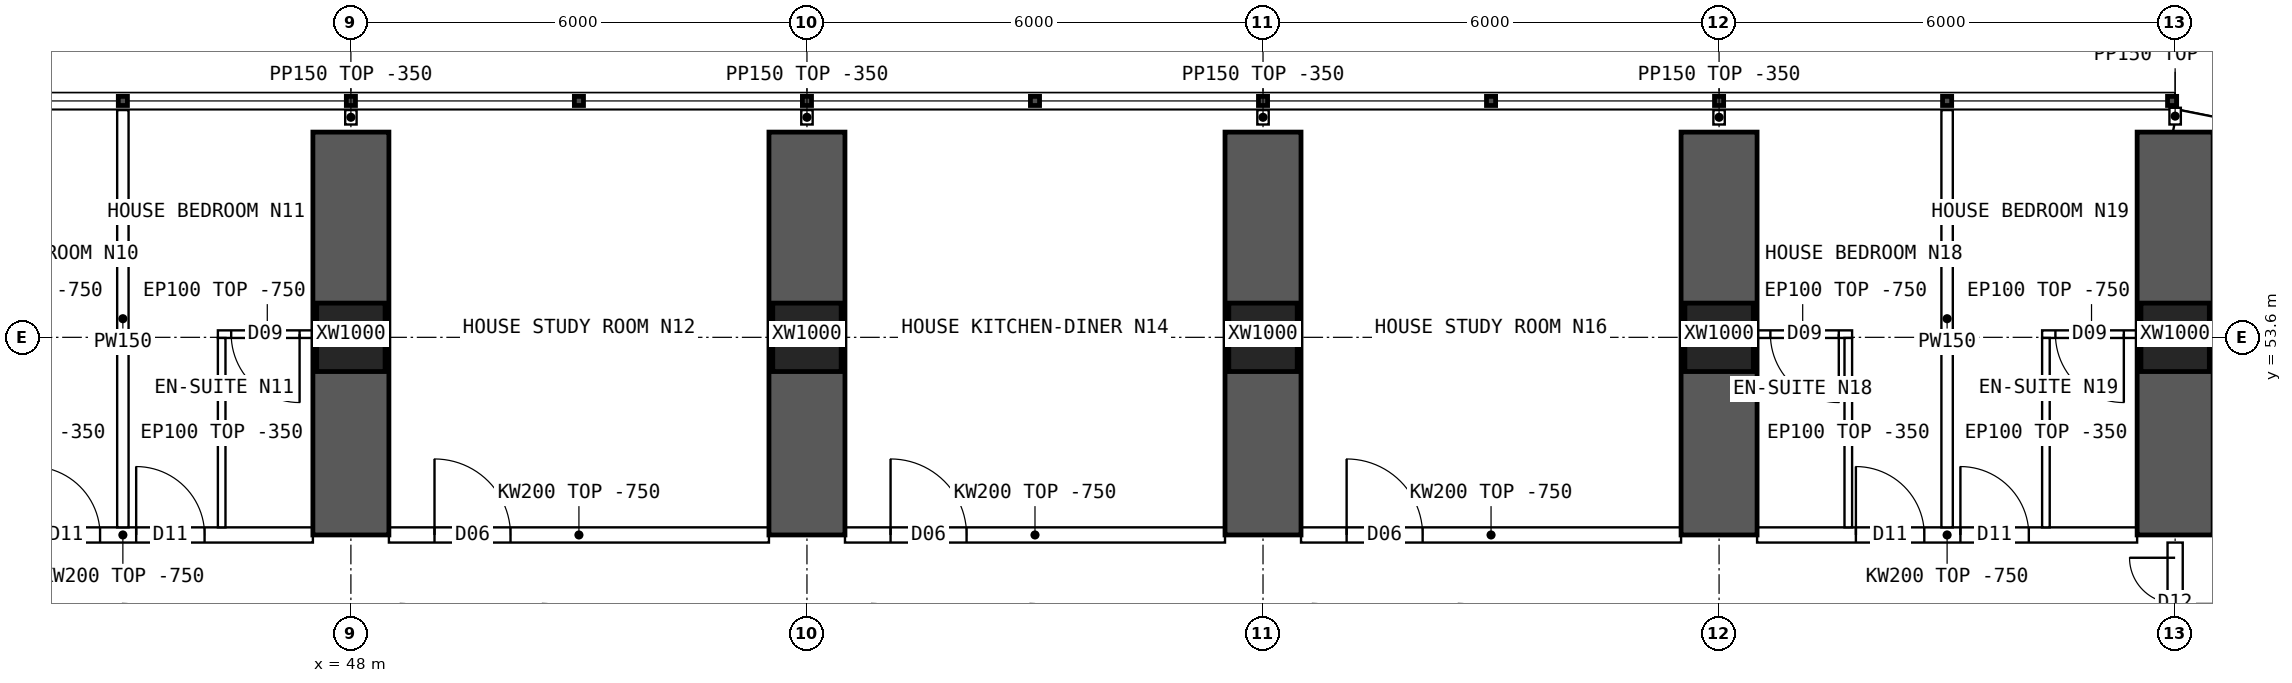
"""IFC4 building model, lengths in metres.
Left out: names, types, materials, properties, quantities, classifications, styles, units other than length and angle.
Written with IfcOpenShell. Run it as: python <this file> out.ifc"""

import sys

from ifc_helpers import new_model, si_unit, direction, frame, frame_2d, origin, origin_2d, place, context, subcontext, project, spatial, polyline, rectangle, hollow_rectangle, outline, extrude, element, fill, save


model = new_model("IFC4")
c1 = context("Model", 3, precision=1e-05, world=origin(), true_north=direction((0.0, 1.0)))
c2 = subcontext(c1, "Body", "Model", "MODEL_VIEW")
j1 = project(units=[si_unit("LENGTHUNIT", "METRE"), si_unit("PLANEANGLEUNIT", "RADIAN")], contexts=[c1])
p1 = place(None, origin())
s1 = spatial("IfcSite", under=j1, at=p1, CompositionType="ELEMENT")
p2 = place(p1, origin())
s2 = spatial("IfcBuilding", under=s1, at=p2, CompositionType="ELEMENT")
p3 = place(p2, frame((0.0, 0.0, 65.2)))
s3 = spatial("IfcBuildingStorey", under=s2, at=p3, CompositionType="ELEMENT", Elevation=65.2)
for number, where, z_axis, x_axis in (
    (1, (48.0, 53.6, 0.0), (0.0, 0.0, 1.0), (1.0, 0.0, 0.0)),
    (2, (54.0, 53.6, 0.0), (0.0, 0.0, 1.0), (1.0, 0.0, 0.0)),
    (3, (60.0, 53.6, 0.0), (0.0, 0.0, 1.0), (1.0, 0.0, 0.0)),
    (4, (66.0, 53.6, 0.0), (0.0, 0.0, 1.0), (1.0, 0.0, 0.0)),
    (5, (72.0, 53.6, 0.0), (0.0, 0.0, 1.0), (1.0, 0.0, 0.0)),
):
    element("IfcColumn", number, at=place(p3, frame(where, z_axis=z_axis, x_axis=x_axis)), inside=s3, PredefinedType="COLUMN", context=c2, shape_type="SweptSolid", body=[
        extrude(hollow_rectangle(XDim=0.9, YDim=0.9, WallThickness=0.09, at=origin_2d()), origin(), (0.0, 0.0, 1.0), 3.75),
    ])
for number, where, z_axis, x_axis in (
    (6, (48.0, 51.0, 0.0), (0.0, 0.0, 1.0), (0.0, 1.0, 0.0)),
    (7, (54.0, 51.0, 0.0), (0.0, 0.0, 1.0), (0.0, 1.0, 0.0)),
    (8, (60.0, 51.0, 0.0), (0.0, 0.0, 1.0), (0.0, 1.0, 0.0)),
    (9, (66.0, 51.0, 0.0), (0.0, 0.0, 1.0), (0.0, 1.0, 0.0)),
    (10, (72.0, 51.0, 0.0), (0.0, 0.0, 1.0), (0.0, 1.0, 0.0)),
):
    element("IfcWall", number, at=place(p3, frame(where, z_axis=z_axis, x_axis=x_axis)), inside=s3, PredefinedType="SHEAR", context=c2, shape_type="SweptSolid", body=[
        extrude(rectangle(XDim=5.3, YDim=1.0, at=frame_2d((2.65, 0.0))), origin(), (0.0, 0.0, 1.0), 3.75),
    ])
p4 = place(p3, frame((75.157, 55.822, 0.0), z_axis=(0.0, 0.0, 1.0), x_axis=(-0.980787251524, 0.195080412259, 0.0)))
e11 = element("IfcWall", 11, at=p4, inside=s3, PredefinedType="SOLIDWALL", context=c2, shape_type="SweptSolid", body=[
    extrude(outline(polyline([(-0.03, -0.15), (3.249, -0.15), (3.189, 0.15), (0.03, 0.15), (-0.03, -0.15)])), origin(), (0.0, 0.0, 1.0), 3.4),
])
p5 = place(p4, frame((0.909, 0.0, 0.9)))
e12 = element("IfcOpeningElement", 12, at=p5, cuts=e11, PredefinedType="OPENING", context=c2, shape_type="SweptSolid", body=[
    extrude(rectangle(XDim=1.4, YDim=1.8, at=frame_2d((0.7, 0.9))), frame((0.0, 0.16, 0.0), z_axis=(0.0, -1.0, 0.0), x_axis=(1.0, 0.0, 0.0)), (0.0, 0.0, 1.0), 0.32),
])
p6 = place(p3, frame((42.5, 51.0, 0.0), z_axis=(0.0, 0.0, 1.0), x_axis=(1.0, 0.0, 0.0)))
e13 = element("IfcWall", 13, at=p6, inside=s3, PredefinedType="SOLIDWALL", context=c2, shape_type="SweptSolid", body=[
    extrude(outline(polyline([(0.0, 0.0), (5.0, 0.0), (5.0, 3.0), (0.0, 3.0), (0.0, 0.0)])), frame((0.0, 0.1, 0.0), z_axis=(0.0, -1.0, 0.0), x_axis=(1.0, 0.0, 0.0)), (0.0, 0.0, 1.0), 0.2),
])
p7 = place(p6, frame((1.3, 0.0, 0.0)))
e14 = element("IfcOpeningElement", 14, at=p7, cuts=e13, PredefinedType="OPENING", context=c2, shape_type="SweptSolid", body=[
    extrude(rectangle(XDim=0.9, YDim=2.1, at=frame_2d((0.45, 1.05))), frame((0.0, 0.11, 0.0), z_axis=(0.0, -1.0, 0.0), x_axis=(1.0, 0.0, 0.0)), (0.0, 0.0, 1.0), 0.22),
])
p8 = place(p6, frame((2.675, 0.0, 0.0)))
e15 = element("IfcOpeningElement", 15, at=p8, cuts=e13, PredefinedType="OPENING", context=c2, shape_type="SweptSolid", body=[
    extrude(rectangle(XDim=0.9, YDim=2.1, at=frame_2d((0.45, 1.05))), frame((0.0, 0.11, 0.0), z_axis=(0.0, -1.0, 0.0), x_axis=(1.0, 0.0, 0.0)), (0.0, 0.0, 1.0), 0.22),
])
p9 = place(p3, frame((48.5, 51.0, 0.0), z_axis=(0.0, 0.0, 1.0), x_axis=(1.0, 0.0, 0.0)))
e16 = element("IfcWall", 16, at=p9, inside=s3, PredefinedType="SOLIDWALL", context=c2, shape_type="SweptSolid", body=[
    extrude(outline(polyline([(0.0, 0.0), (5.0, 0.0), (5.0, 3.0), (0.0, 3.0), (0.0, 0.0)])), frame((0.0, 0.1, 0.0), z_axis=(0.0, -1.0, 0.0), x_axis=(1.0, 0.0, 0.0)), (0.0, 0.0, 1.0), 0.2),
])
p10 = place(p9, frame((0.6, 0.0, 0.0)))
e17 = element("IfcOpeningElement", 17, at=p10, cuts=e16, PredefinedType="OPENING", context=c2, shape_type="SweptSolid", body=[
    extrude(rectangle(XDim=1.0, YDim=2.1, at=frame_2d((0.5, 1.05))), frame((0.0, 0.11, 0.0), z_axis=(0.0, -1.0, 0.0), x_axis=(1.0, 0.0, 0.0)), (0.0, 0.0, 1.0), 0.22),
])
p11 = place(p3, frame((54.5, 51.0, 0.0), z_axis=(0.0, 0.0, 1.0), x_axis=(1.0, 0.0, 0.0)))
e18 = element("IfcWall", 18, at=p11, inside=s3, PredefinedType="SOLIDWALL", context=c2, shape_type="SweptSolid", body=[
    extrude(outline(polyline([(0.0, 0.0), (5.0, 0.0), (5.0, 3.0), (0.0, 3.0), (0.0, 0.0)])), frame((0.0, 0.1, 0.0), z_axis=(0.0, -1.0, 0.0), x_axis=(1.0, 0.0, 0.0)), (0.0, 0.0, 1.0), 0.2),
])
p12 = place(p11, frame((0.6, 0.0, 0.0)))
e19 = element("IfcOpeningElement", 19, at=p12, cuts=e18, PredefinedType="OPENING", context=c2, shape_type="SweptSolid", body=[
    extrude(rectangle(XDim=1.0, YDim=2.1, at=frame_2d((0.5, 1.05))), frame((0.0, 0.11, 0.0), z_axis=(0.0, -1.0, 0.0), x_axis=(1.0, 0.0, 0.0)), (0.0, 0.0, 1.0), 0.22),
])
p13 = place(p3, frame((60.5, 51.0, 0.0), z_axis=(0.0, 0.0, 1.0), x_axis=(1.0, 0.0, 0.0)))
e20 = element("IfcWall", 20, at=p13, inside=s3, PredefinedType="SOLIDWALL", context=c2, shape_type="SweptSolid", body=[
    extrude(outline(polyline([(0.0, 0.0), (5.0, 0.0), (5.0, 3.0), (0.0, 3.0), (0.0, 0.0)])), frame((0.0, 0.1, 0.0), z_axis=(0.0, -1.0, 0.0), x_axis=(1.0, 0.0, 0.0)), (0.0, 0.0, 1.0), 0.2),
])
p14 = place(p13, frame((0.6, 0.0, 0.0)))
e21 = element("IfcOpeningElement", 21, at=p14, cuts=e20, PredefinedType="OPENING", context=c2, shape_type="SweptSolid", body=[
    extrude(rectangle(XDim=1.0, YDim=2.1, at=frame_2d((0.5, 1.05))), frame((0.0, 0.11, 0.0), z_axis=(0.0, -1.0, 0.0), x_axis=(1.0, 0.0, 0.0)), (0.0, 0.0, 1.0), 0.22),
])
p15 = place(p3, frame((66.5, 51.0, 0.0), z_axis=(0.0, 0.0, 1.0), x_axis=(1.0, 0.0, 0.0)))
e22 = element("IfcWall", 22, at=p15, inside=s3, PredefinedType="SOLIDWALL", context=c2, shape_type="SweptSolid", body=[
    extrude(outline(polyline([(0.0, 0.0), (5.0, 0.0), (5.0, 3.0), (0.0, 3.0), (0.0, 0.0)])), frame((0.0, 0.1, 0.0), z_axis=(0.0, -1.0, 0.0), x_axis=(1.0, 0.0, 0.0)), (0.0, 0.0, 1.0), 0.2),
])
p16 = place(p15, frame((1.3, 0.0, 0.0)))
e23 = element("IfcOpeningElement", 23, at=p16, cuts=e22, PredefinedType="OPENING", context=c2, shape_type="SweptSolid", body=[
    extrude(rectangle(XDim=0.9, YDim=2.1, at=frame_2d((0.45, 1.05))), frame((0.0, 0.11, 0.0), z_axis=(0.0, -1.0, 0.0), x_axis=(1.0, 0.0, 0.0)), (0.0, 0.0, 1.0), 0.22),
])
p17 = place(p15, frame((2.675, 0.0, 0.0)))
e24 = element("IfcOpeningElement", 24, at=p17, cuts=e22, PredefinedType="OPENING", context=c2, shape_type="SweptSolid", body=[
    extrude(rectangle(XDim=0.9, YDim=2.1, at=frame_2d((0.45, 1.05))), frame((0.0, 0.11, 0.0), z_axis=(0.0, -1.0, 0.0), x_axis=(1.0, 0.0, 0.0)), (0.0, 0.0, 1.0), 0.22),
])
p18 = place(p3, frame((45.0, 56.59, 0.0), z_axis=(0.0, 0.0, 1.0), x_axis=(0.0, -1.0, 0.0)))
e25 = element("IfcWall", 25, at=p18, inside=s3, PredefinedType="PARTITIONING", context=c2, shape_type="SweptSolid", body=[
    extrude(outline(polyline([(0.0, 0.0), (5.49, 0.0), (5.49, 3.0), (5.442, 3.0), (5.44, 3.4), (3.192, 3.4), (3.19, 3.0), (2.792, 3.0), (2.79, 3.4), (0.0, 3.4), (0.0, 0.0)])), frame((0.0, 0.075, 0.0), z_axis=(0.0, -1.0, 0.0), x_axis=(1.0, 0.0, 0.0)), (0.0, 0.0, 1.0), 0.15),
])
p19 = place(p3, frame((46.25, 53.642, 0.0), z_axis=(0.0, 0.0, 1.0), x_axis=(1.0, 0.0, 0.0)))
e26 = element("IfcWall", 26, at=p19, inside=s3, PredefinedType="PARTITIONING", context=c2, shape_type="SweptSolid", body=[
    extrude(outline(polyline([(0.0, 0.0), (1.3, 0.0), (1.3, 3.0), (0.0, 3.0), (0.0, 0.0)])), frame((0.0, 0.05, 0.0), z_axis=(0.0, -1.0, 0.0), x_axis=(1.0, 0.0, 0.0)), (0.0, 0.0, 1.0), 0.1),
])
p20 = place(p19, frame((0.175, 0.0, 0.0)))
e27 = element("IfcOpeningElement", 27, at=p20, cuts=e26, PredefinedType="OPENING", context=c2, shape_type="SweptSolid", body=[
    extrude(rectangle(XDim=0.9, YDim=2.1, at=frame_2d((0.45, 1.05))), frame((0.0, 0.06, 0.0), z_axis=(0.0, -1.0, 0.0), x_axis=(1.0, 0.0, 0.0)), (0.0, 0.0, 1.0), 0.12),
])
p21 = place(p3, frame((46.3, 53.592, 0.0), z_axis=(0.0, 0.0, 1.0), x_axis=(0.0, -1.0, 0.0)))
e28 = element("IfcWall", 28, at=p21, inside=s3, PredefinedType="PARTITIONING", context=c2, shape_type="SweptSolid", body=[
    extrude(outline(polyline([(0.0, 0.0), (2.492, 0.0), (2.492, 3.0), (2.444, 3.0), (2.442, 3.4), (0.194, 3.4), (0.192, 3.0), (0.0, 3.0), (0.0, 0.0)])), frame((0.0, 0.05, 0.0), z_axis=(0.0, -1.0, 0.0), x_axis=(1.0, 0.0, 0.0)), (0.0, 0.0, 1.0), 0.1),
])
p22 = place(p3, frame((69.0, 56.59, 0.0), z_axis=(0.0, 0.0, 1.0), x_axis=(0.0, -1.0, 0.0)))
e29 = element("IfcWall", 29, at=p22, inside=s3, PredefinedType="PARTITIONING", context=c2, shape_type="SweptSolid", body=[
    extrude(outline(polyline([(0.0, 0.0), (5.49, 0.0), (5.49, 3.0), (5.442, 3.0), (5.44, 3.4), (3.192, 3.4), (3.19, 3.0), (2.792, 3.0), (2.79, 3.4), (0.0, 3.4), (0.0, 0.0)])), frame((0.0, 0.075, 0.0), z_axis=(0.0, -1.0, 0.0), x_axis=(1.0, 0.0, 0.0)), (0.0, 0.0, 1.0), 0.15),
])
p23 = place(p3, frame((66.45, 53.642, 0.0), z_axis=(0.0, 0.0, 1.0), x_axis=(1.0, 0.0, 0.0)))
e30 = element("IfcWall", 30, at=p23, inside=s3, PredefinedType="PARTITIONING", context=c2, shape_type="SweptSolid", body=[
    extrude(outline(polyline([(0.0, 0.0), (1.3, 0.0), (1.3, 3.0), (0.0, 3.0), (0.0, 0.0)])), frame((0.0, 0.05, 0.0), z_axis=(0.0, -1.0, 0.0), x_axis=(1.0, 0.0, 0.0)), (0.0, 0.0, 1.0), 0.1),
])
p24 = place(p23, frame((0.225, 0.0, 0.0)))
e31 = element("IfcOpeningElement", 31, at=p24, cuts=e30, PredefinedType="OPENING", context=c2, shape_type="SweptSolid", body=[
    extrude(rectangle(XDim=0.9, YDim=2.1, at=frame_2d((0.45, 1.05))), frame((0.0, 0.06, 0.0), z_axis=(0.0, -1.0, 0.0), x_axis=(1.0, 0.0, 0.0)), (0.0, 0.0, 1.0), 0.12),
])
p25 = place(p3, frame((67.7, 53.592, 0.0), z_axis=(0.0, 0.0, 1.0), x_axis=(0.0, -1.0, 0.0)))
e32 = element("IfcWall", 32, at=p25, inside=s3, PredefinedType="PARTITIONING", context=c2, shape_type="SweptSolid", body=[
    extrude(outline(polyline([(0.0, 0.0), (2.492, 0.0), (2.492, 3.0), (2.444, 3.0), (2.442, 3.4), (0.194, 3.4), (0.192, 3.0), (0.0, 3.0), (0.0, 0.0)])), frame((0.0, 0.05, 0.0), z_axis=(0.0, -1.0, 0.0), x_axis=(1.0, 0.0, 0.0)), (0.0, 0.0, 1.0), 0.1),
])
p26 = place(p3, frame((70.25, 53.642, 0.0), z_axis=(0.0, 0.0, 1.0), x_axis=(1.0, 0.0, 0.0)))
e33 = element("IfcWall", 33, at=p26, inside=s3, PredefinedType="PARTITIONING", context=c2, shape_type="SweptSolid", body=[
    extrude(outline(polyline([(0.0, 0.0), (1.3, 0.0), (1.3, 3.0), (0.0, 3.0), (0.0, 0.0)])), frame((0.0, 0.05, 0.0), z_axis=(0.0, -1.0, 0.0), x_axis=(1.0, 0.0, 0.0)), (0.0, 0.0, 1.0), 0.1),
])
p27 = place(p26, frame((0.175, 0.0, 0.0)))
e34 = element("IfcOpeningElement", 34, at=p27, cuts=e33, PredefinedType="OPENING", context=c2, shape_type="SweptSolid", body=[
    extrude(rectangle(XDim=0.9, YDim=2.1, at=frame_2d((0.45, 1.05))), frame((0.0, 0.06, 0.0), z_axis=(0.0, -1.0, 0.0), x_axis=(1.0, 0.0, 0.0)), (0.0, 0.0, 1.0), 0.12),
])
p28 = place(p3, frame((70.3, 53.592, 0.0), z_axis=(0.0, 0.0, 1.0), x_axis=(0.0, -1.0, 0.0)))
e35 = element("IfcWall", 35, at=p28, inside=s3, PredefinedType="PARTITIONING", context=c2, shape_type="SweptSolid", body=[
    extrude(outline(polyline([(0.0, 0.0), (2.492, 0.0), (2.492, 3.0), (2.444, 3.0), (2.442, 3.4), (0.194, 3.4), (0.192, 3.0), (0.0, 3.0), (0.0, 0.0)])), frame((0.0, 0.05, 0.0), z_axis=(0.0, -1.0, 0.0), x_axis=(1.0, 0.0, 0.0)), (0.0, 0.0, 1.0), 0.1),
])
p29 = place(p3, frame((72.0, 49.3, 0.0), z_axis=(0.0, 0.0, 1.0), x_axis=(0.0, 1.0, 0.0)))
e36 = element("IfcWall", 36, at=p29, inside=s3, PredefinedType="SOLIDWALL", context=c2, shape_type="SweptSolid", body=[
    extrude(outline(polyline([(0.0, 0.0), (1.6, 0.0), (1.6, 2.95), (0.0, 2.95), (0.0, 0.0)])), frame((0.0, 0.1, 0.0), z_axis=(0.0, -1.0, 0.0), x_axis=(1.0, 0.0, 0.0)), (0.0, 0.0, 1.0), 0.2),
])
p30 = place(p29, frame((0.2, 0.0, 0.0)))
e37 = element("IfcOpeningElement", 37, at=p30, cuts=e36, PredefinedType="OPENING", context=c2, shape_type="SweptSolid", body=[
    extrude(rectangle(XDim=1.2, YDim=2.1, at=frame_2d((0.6, 1.05))), frame((0.0, 0.11, 0.0), z_axis=(0.0, -1.0, 0.0), x_axis=(1.0, 0.0, 0.0)), (0.0, 0.0, 1.0), 0.22),
])
for number, where, z_axis, x_axis in (
    (38, (48.0, 56.4, 0.0), (0.0, 0.0, 1.0), (0.0, 1.0, 0.0)),
    (39, (54.0, 56.4, 0.0), (0.0, 0.0, 1.0), (0.0, 1.0, 0.0)),
    (40, (60.0, 56.4, 0.0), (0.0, 0.0, 1.0), (0.0, 1.0, 0.0)),
    (41, (66.0, 56.4, 0.0), (0.0, 0.0, 1.0), (0.0, 1.0, 0.0)),
):
    element("IfcWall", number, at=place(p3, frame(where, z_axis=z_axis, x_axis=x_axis)), inside=s3, PredefinedType="PARTITIONING", context=c2, shape_type="SweptSolid", body=[
        extrude(rectangle(XDim=0.19, YDim=0.15, at=frame_2d((0.095, 0.0))), origin(), (0.0, 0.0, 1.0), 3.4),
    ])
p31 = place(p3, frame((72.0, 56.4, 0.0), z_axis=(0.0, 0.0, 1.0), x_axis=(0.0, 1.0, 0.0)))
e42 = element("IfcWall", 42, at=p31, inside=s3, PredefinedType="PARTITIONING", context=c2, shape_type="SweptSolid", body=[
    extrude(rectangle(XDim=0.22, YDim=0.15, at=frame_2d((0.11, 0.0))), origin(), (0.0, 0.0, 1.0), 3.4),
])
p32 = place(p7, origin())
e43 = element("IfcDoor", 43, at=p32, inside=s3, OperationType="SINGLE_SWING_LEFT", PredefinedType="DOOR", context=c2, shape_type="SweptSolid", body=[
    extrude(rectangle(XDim=0.9, YDim=2.1, at=frame_2d((0.45, 1.05))), frame((0.0, 0.025, 0.0), z_axis=(0.0, -1.0, 0.0), x_axis=(1.0, 0.0, 0.0)), (0.0, 0.0, 1.0), 0.05),
])
fill(e14, e43)
p33 = place(p20, origin())
e44 = element("IfcDoor", 44, at=p33, inside=s3, OperationType="SINGLE_SWING_RIGHT", PredefinedType="DOOR", context=c2, shape_type="SweptSolid", body=[
    extrude(rectangle(XDim=0.9, YDim=2.1, at=frame_2d((0.45, 1.05))), frame((0.0, 0.025, 0.0), z_axis=(0.0, -1.0, 0.0), x_axis=(1.0, 0.0, 0.0)), (0.0, 0.0, 1.0), 0.05),
])
fill(e27, e44)
p34 = place(p8, origin())
e45 = element("IfcDoor", 45, at=p34, inside=s3, OperationType="SINGLE_SWING_LEFT", PredefinedType="DOOR", context=c2, shape_type="SweptSolid", body=[
    extrude(rectangle(XDim=0.9, YDim=2.1, at=frame_2d((0.45, 1.05))), frame((0.0, 0.025, 0.0), z_axis=(0.0, -1.0, 0.0), x_axis=(1.0, 0.0, 0.0)), (0.0, 0.0, 1.0), 0.05),
])
fill(e15, e45)
p35 = place(p10, origin())
e46 = element("IfcDoor", 46, at=p35, inside=s3, OperationType="SINGLE_SWING_LEFT", PredefinedType="DOOR", context=c2, shape_type="SweptSolid", body=[
    extrude(rectangle(XDim=1.0, YDim=2.1, at=frame_2d((0.5, 1.05))), frame((0.0, 0.025, 0.0), z_axis=(0.0, -1.0, 0.0), x_axis=(1.0, 0.0, 0.0)), (0.0, 0.0, 1.0), 0.05),
])
fill(e17, e46)
p36 = place(p12, origin())
e47 = element("IfcDoor", 47, at=p36, inside=s3, OperationType="SINGLE_SWING_LEFT", PredefinedType="DOOR", context=c2, shape_type="SweptSolid", body=[
    extrude(rectangle(XDim=1.0, YDim=2.1, at=frame_2d((0.5, 1.05))), frame((0.0, 0.025, 0.0), z_axis=(0.0, -1.0, 0.0), x_axis=(1.0, 0.0, 0.0)), (0.0, 0.0, 1.0), 0.05),
])
fill(e19, e47)
p37 = place(p14, origin())
e48 = element("IfcDoor", 48, at=p37, inside=s3, OperationType="SINGLE_SWING_LEFT", PredefinedType="DOOR", context=c2, shape_type="SweptSolid", body=[
    extrude(rectangle(XDim=1.0, YDim=2.1, at=frame_2d((0.5, 1.05))), frame((0.0, 0.025, 0.0), z_axis=(0.0, -1.0, 0.0), x_axis=(1.0, 0.0, 0.0)), (0.0, 0.0, 1.0), 0.05),
])
fill(e21, e48)
p38 = place(p24, origin())
e49 = element("IfcDoor", 49, at=p38, inside=s3, OperationType="SINGLE_SWING_RIGHT", PredefinedType="DOOR", context=c2, shape_type="SweptSolid", body=[
    extrude(rectangle(XDim=0.9, YDim=2.1, at=frame_2d((0.45, 1.05))), frame((0.0, 0.025, 0.0), z_axis=(0.0, -1.0, 0.0), x_axis=(1.0, 0.0, 0.0)), (0.0, 0.0, 1.0), 0.05),
])
fill(e31, e49)
p39 = place(p16, origin())
e50 = element("IfcDoor", 50, at=p39, inside=s3, OperationType="SINGLE_SWING_LEFT", PredefinedType="DOOR", context=c2, shape_type="SweptSolid", body=[
    extrude(rectangle(XDim=0.9, YDim=2.1, at=frame_2d((0.45, 1.05))), frame((0.0, 0.025, 0.0), z_axis=(0.0, -1.0, 0.0), x_axis=(1.0, 0.0, 0.0)), (0.0, 0.0, 1.0), 0.05),
])
fill(e23, e50)
p40 = place(p27, origin())
e51 = element("IfcDoor", 51, at=p40, inside=s3, OperationType="SINGLE_SWING_RIGHT", PredefinedType="DOOR", context=c2, shape_type="SweptSolid", body=[
    extrude(rectangle(XDim=0.9, YDim=2.1, at=frame_2d((0.45, 1.05))), frame((0.0, 0.025, 0.0), z_axis=(0.0, -1.0, 0.0), x_axis=(1.0, 0.0, 0.0)), (0.0, 0.0, 1.0), 0.05),
])
fill(e34, e51)
p41 = place(p17, origin())
e52 = element("IfcDoor", 52, at=p41, inside=s3, OperationType="SINGLE_SWING_LEFT", PredefinedType="DOOR", context=c2, shape_type="SweptSolid", body=[
    extrude(rectangle(XDim=0.9, YDim=2.1, at=frame_2d((0.45, 1.05))), frame((0.0, 0.025, 0.0), z_axis=(0.0, -1.0, 0.0), x_axis=(1.0, 0.0, 0.0)), (0.0, 0.0, 1.0), 0.05),
])
fill(e24, e52)
p42 = place(p30, origin())
e53 = element("IfcDoor", 53, at=p42, inside=s3, OperationType="DOUBLE_DOOR_SINGLE_SWING", PredefinedType="DOOR", context=c2, shape_type="SweptSolid", body=[
    extrude(rectangle(XDim=1.2, YDim=2.1, at=frame_2d((0.6, 1.05))), frame((0.0, 0.025, 0.0), z_axis=(0.0, -1.0, 0.0), x_axis=(1.0, 0.0, 0.0)), (0.0, 0.0, 1.0), 0.05),
])
fill(e37, e53)
save(model, sys.argv[1])
